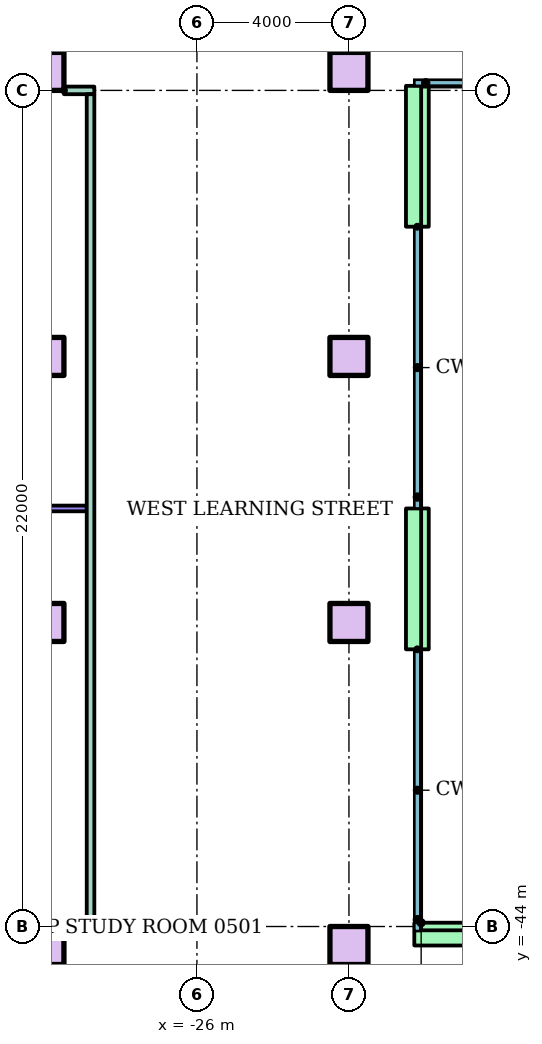
"""IFC4 building model, lengths in metres.
Left out: names, types, materials, properties, quantities, classifications, styles, units other than length and angle.
Written with IfcOpenShell. Run it as: python <this file> out.ifc"""

import sys

from ifc_helpers import new_model, si_unit, direction, frame, frame_2d, origin, origin_2d, place, context, subcontext, project, spatial, rectangle, extrude, element, save


model = new_model("IFC4")
c1 = context("Model", 3, precision=1e-05, world=origin(), true_north=direction((0.0, 1.0)))
c2 = subcontext(c1, "Body", "Model", "MODEL_VIEW")
j1 = project(units=[si_unit("LENGTHUNIT", "METRE"), si_unit("PLANEANGLEUNIT", "RADIAN")], contexts=[c1])
p1 = place(None, origin())
s1 = spatial("IfcSite", under=j1, at=p1, CompositionType="ELEMENT")
p2 = place(p1, origin())
s2 = spatial("IfcBuilding", under=s1, at=p2, CompositionType="ELEMENT")
p3 = place(p2, frame((0.0, 0.0, 22.0)))
s3 = spatial("IfcBuildingStorey", under=s2, at=p3, CompositionType="ELEMENT", Elevation=22.0)
for number, where in (
    (1, (-30.0, -44.5, 0.0)),
    (2, (-22.0, -44.5, 0.0)),
    (3, (-30.0, -36.0, 0.0)),
    (4, (-22.0, -36.0, 0.0)),
    (5, (-30.0, -29.0, 0.0)),
    (6, (-22.0, -29.0, 0.0)),
    (7, (-30.0, -21.5, 0.0)),
    (8, (-22.0, -21.5, 0.0)),
):
    element("IfcColumn", number, at=place(p3, frame(where)), inside=s3, PredefinedType="COLUMN", context=c2, shape_type="SweptSolid", body=[
        extrude(rectangle(XDim=1.0, YDim=1.0, at=origin_2d()), origin(), (0.0, 0.0, 1.0), 3.7),
    ])
p4 = place(p3, frame((-18.0, -44.2, 0.0), z_axis=(0.0, 0.0, 1.0), x_axis=(-1.0, 0.0, 0.0)))
e9 = element("IfcWall", 9, at=p4, inside=s3, PredefinedType="STANDARD", context=c2, shape_type="SweptSolid", body=[
    extrude(rectangle(XDim=2.28, YDim=0.6, at=frame_2d((1.14, 0.0))), origin(), (0.0, 0.0, 1.0), 3.7),
])
for number, where, z_axis, x_axis in (
    (10, (-20.2, -36.707, 0.0), (0.0, 0.0, 1.0), (0.0, 1.0, 0.0)),
    (11, (-20.2, -25.587, 0.0), (0.0, 0.0, 1.0), (0.0, 1.0, 0.0)),
):
    element("IfcWall", number, at=place(p3, frame(where, z_axis=z_axis, x_axis=x_axis)), inside=s3, PredefinedType="STANDARD", context=c2, shape_type="SweptSolid", body=[
        extrude(rectangle(XDim=3.707, YDim=0.6, at=frame_2d((1.854, 0.0))), origin(), (0.0, 0.0, 1.0), 3.7),
    ])
p5 = place(p3, frame((-29.5, -44.0, 0.0)))
e12 = element("IfcWall", 12, at=p5, inside=s3, PredefinedType="PARTITIONING", context=c2, shape_type="SweptSolid", body=[
    extrude(rectangle(XDim=0.6, YDim=0.2, at=frame_2d((0.3, 0.0))), origin(), (0.0, 0.0, 1.0), 3.2),
])
p6 = place(p3, frame((-39.6, -33.0, 0.0)))
e13 = element("IfcWall", 13, at=p6, inside=s3, PredefinedType="PARTITIONING", context=c2, shape_type="SweptSolid", body=[
    extrude(rectangle(XDim=10.7, YDim=0.15, at=frame_2d((5.35, 0.0))), origin(), (0.0, 0.0, 1.0), 3.2),
])
p7 = place(p3, frame((-29.5, -22.0, 0.0)))
e14 = element("IfcWall", 14, at=p7, inside=s3, PredefinedType="PARTITIONING", context=c2, shape_type="SweptSolid", body=[
    extrude(rectangle(XDim=0.8, YDim=0.2, at=frame_2d((0.4, 0.0))), origin(), (0.0, 0.0, 1.0), 3.2),
])
p8 = place(p3, frame((-28.8, -44.0, 0.0), z_axis=(0.0, 0.0, 1.0), x_axis=(0.0, 1.0, 0.0)))
e15 = element("IfcWall", 15, at=p8, inside=s3, PredefinedType="PARTITIONING", context=c2, shape_type="SweptSolid", body=[
    extrude(rectangle(XDim=21.9, YDim=0.2, at=frame_2d((10.95, 0.0))), origin(), (0.0, 0.0, 1.0), 3.2),
])
save(model, sys.argv[1])
